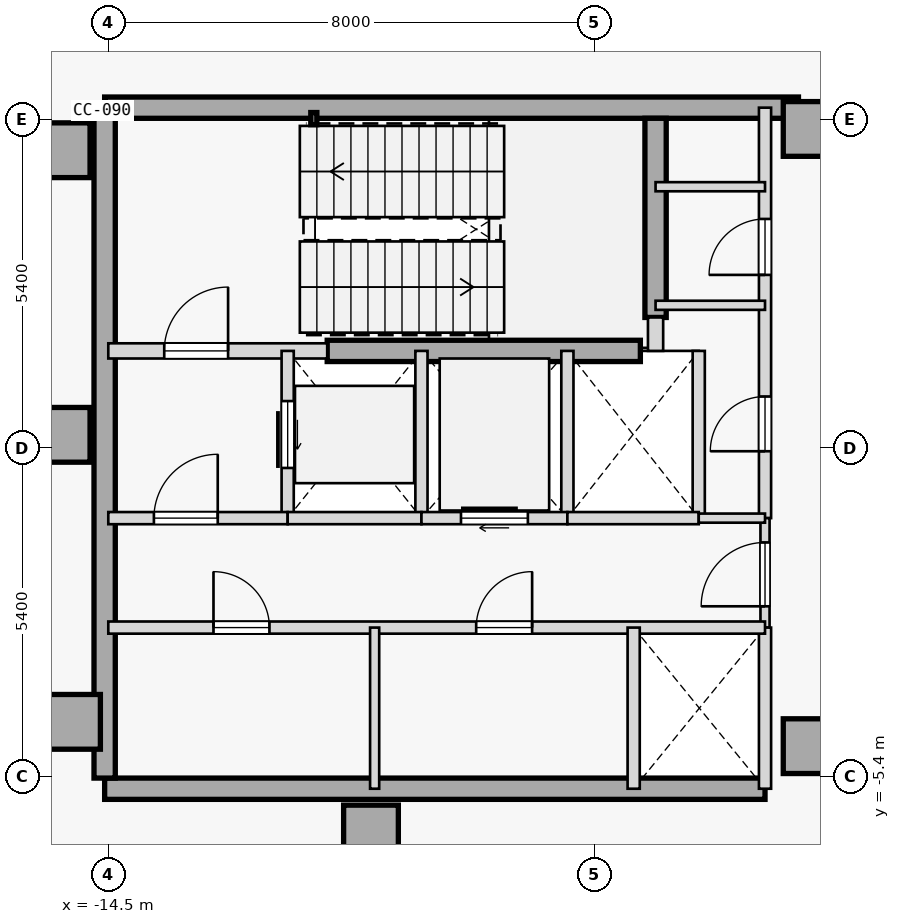
"""IFC4 building model, lengths in metres.
Left out: names, types, materials, properties, quantities, classifications, styles, units other than length and angle.
Written with IfcOpenShell. Run it as: python <this file> out.ifc"""

import sys

from ifc_helpers import new_model, si_unit, direction, frame, frame_2d, origin, origin_2d, place, context, subcontext, project, spatial, rectangle, hollow_rectangle, extrude, element, fill, save


model = new_model("IFC4")
c1 = context("Model", 3, precision=1e-05, world=origin(), true_north=direction((0.0, 1.0)))
c2 = subcontext(c1, "Body", "Model", "MODEL_VIEW")
j1 = project(units=[si_unit("LENGTHUNIT", "METRE"), si_unit("PLANEANGLEUNIT", "RADIAN")], contexts=[c1])
p1 = place(None, origin())
s1 = spatial("IfcSite", under=j1, at=p1, CompositionType="ELEMENT")
p2 = place(p1, origin())
s2 = spatial("IfcBuilding", under=s1, at=p2, CompositionType="ELEMENT")
p3 = place(p2, frame((0.0, 0.0, 254.45)))
s3 = spatial("IfcBuildingStorey", under=s2, at=p3, CompositionType="ELEMENT", Elevation=254.45)
for number, where, z_axis, x_axis in (
    (1, (-15.25, 4.9, 0.0), (0.0, 0.0, 1.0), (1.0, 0.0, 0.0)),
    (2, (-15.25, 0.22, 0.0), (0.0, 0.0, 1.0), (1.0, 0.0, 0.0)),
    (3, (-15.08, -4.5, 0.0), (0.0, 0.0, 1.0), (1.0, 0.0, 0.0)),
    (4, (-10.18, -6.32, 0.0), (0.0, 0.0, 1.0), (1.0, 0.0, 0.0)),
    (5, (-2.95, -4.9, 0.0), (0.0, 0.0, 1.0), (1.0, 0.0, 0.0)),
    (6, (-2.95, 5.25, 0.0), (0.0, 0.0, 1.0), (1.0, 0.0, 0.0)),
):
    element("IfcColumn", number, at=place(p3, frame(where, z_axis=z_axis, x_axis=x_axis)), inside=s3, PredefinedType="COLUMN", context=c2, shape_type="SweptSolid", body=[
        extrude(rectangle(XDim=0.9, YDim=0.9, at=origin_2d()), origin(), (0.0, 0.0, 1.0), 4.4),
    ])
p4 = place(p3, frame((-14.56, 5.6, 0.0), z_axis=(0.0, 0.0, 1.0), x_axis=(1.0, 0.0, 0.0)))
e7 = element("IfcWall", 7, at=p4, inside=s3, PredefinedType="SHEAR", context=c2, shape_type="SweptSolid", body=[
    extrude(rectangle(XDim=11.41, YDim=0.35, at=frame_2d((5.705, 0.0))), origin(), (0.0, 0.0, 1.0), 4.175),
])
p5 = place(p3, frame((-14.56, -5.6, 0.0), z_axis=(0.0, 0.0, 1.0), x_axis=(1.0, 0.0, 0.0)))
e8 = element("IfcWall", 8, at=p5, inside=s3, PredefinedType="SHEAR", context=c2, shape_type="SweptSolid", body=[
    extrude(rectangle(XDim=10.86, YDim=0.35, at=frame_2d((5.43, 0.0))), origin(), (0.0, 0.0, 1.0), 4.175),
])
p6 = place(p3, frame((-14.56, -5.425, 0.0), z_axis=(0.0, 0.0, 1.0), x_axis=(0.0, 1.0, 0.0)))
e9 = element("IfcWall", 9, at=p6, inside=s3, PredefinedType="SHEAR", context=c2, shape_type="SweptSolid", body=[
    extrude(rectangle(XDim=10.85, YDim=0.35, at=frame_2d((5.425, 0.0))), origin(), (0.0, 0.0, 1.0), 4.175),
])
p7 = place(p3, frame((-5.5, 2.15, 0.0), z_axis=(0.0, 0.0, 1.0), x_axis=(0.0, 1.0, 0.0)))
e10 = element("IfcWall", 10, at=p7, inside=s3, PredefinedType="SHEAR", context=c2, shape_type="SweptSolid", body=[
    extrude(rectangle(XDim=3.275, YDim=0.35, at=frame_2d((1.638, 0.0))), origin(), (0.0, 0.0, 1.0), 4.175),
])
p8 = place(p3, frame((-10.9, 1.6, 0.0), z_axis=(0.0, 0.0, 1.0), x_axis=(1.0, 0.0, 0.0)))
e11 = element("IfcWall", 11, at=p8, inside=s3, PredefinedType="SHEAR", context=c2, shape_type="SweptSolid", body=[
    extrude(rectangle(XDim=5.15, YDim=0.35, at=frame_2d((2.575, 0.0))), origin(), (0.0, 0.0, 1.0), 4.175),
])
p9 = place(p3, frame((-11.12, 5.42, 0.0), z_axis=(0.0, 0.0, 1.0), x_axis=(1.0, 0.0, 0.0)))
e12 = element("IfcColumn", 12, at=p9, inside=s3, PredefinedType="COLUMN", context=c2, shape_type="SweptSolid", body=[
    extrude(hollow_rectangle(XDim=0.1, YDim=0.2, WallThickness=0.008, at=origin_2d()), origin(), (0.0, 0.0, 1.0), 4.4),
])
p10 = place(p3, frame((18.109, 25.392, 0.0), z_axis=(0.0, 0.0, 1.0), x_axis=(-0.913544894419, -0.406737908095, 0.0)))
e13 = element("IfcWall", 13, at=p10, inside=s3, PredefinedType="STANDARD", context=c2, shape_type="SweptSolid", body=[
    extrude(rectangle(XDim=51.31, YDim=0.3, at=frame_2d((25.655, 0.0))), origin(), (0.0, 0.0, 1.0), 4.175),
])
p11 = place(p10, frame((27.87, 0.0, 0.0)))
e14 = element("IfcOpeningElement", 14, at=p11, cuts=e13, PredefinedType="OPENING", context=c2, shape_type="SweptSolid", body=[
    extrude(rectangle(XDim=1.1, YDim=2.2, at=frame_2d((0.55, 1.1))), frame((0.0, 0.16, 0.0), z_axis=(0.0, -1.0, 0.0), x_axis=(1.0, 0.0, 0.0)), (0.0, 0.0, 1.0), 0.32),
])
p12 = place(p3, frame((-14.5, 1.6, 0.0), z_axis=(0.0, 0.0, 1.0), x_axis=(1.0, 0.0, 0.0)))
e15 = element("IfcWall", 15, at=p12, inside=s3, PredefinedType="STANDARD", context=c2, shape_type="SweptSolid", body=[
    extrude(rectangle(XDim=3.6, YDim=0.25, at=frame_2d((1.8, 0.0))), origin(), (0.0, 0.0, 1.0), 4.175),
])
p13 = place(p12, frame((0.92, 0.0, 0.0)))
e16 = element("IfcOpeningElement", 16, at=p13, cuts=e15, PredefinedType="OPENING", context=c2, shape_type="SweptSolid", body=[
    extrude(rectangle(XDim=1.05, YDim=2.15, at=frame_2d((0.525, 1.075))), frame((0.0, 0.135, 0.0), z_axis=(0.0, -1.0, 0.0), x_axis=(1.0, 0.0, 0.0)), (0.0, 0.0, 1.0), 0.27),
])
p14 = place(p3, frame((-5.5, 1.6, 0.0), z_axis=(0.0, 0.0, 1.0), x_axis=(0.0, 1.0, 0.0)))
e17 = element("IfcWall", 17, at=p14, inside=s3, PredefinedType="STANDARD", context=c2, shape_type="SweptSolid", body=[
    extrude(rectangle(XDim=0.55, YDim=0.25, at=frame_2d((0.275, 0.0))), origin(), (0.0, 0.0, 1.0), 4.175),
])
p15 = place(p3, frame((-3.7, -1.15, 0.0), z_axis=(0.0, 0.0, 1.0), x_axis=(0.0, 1.0, 0.0)))
e18 = element("IfcWall", 18, at=p15, inside=s3, PredefinedType="STANDARD", context=c2, shape_type="SweptSolid", body=[
    extrude(rectangle(XDim=6.75, YDim=0.2, at=frame_2d((3.375, 0.0))), origin(), (0.0, 0.0, 1.0), 4.175),
])
p16 = place(p15, frame((1.1, 0.0, 0.0)))
e19 = element("IfcOpeningElement", 19, at=p16, cuts=e18, PredefinedType="OPENING", context=c2, shape_type="SweptSolid", body=[
    extrude(rectangle(XDim=0.9, YDim=2.15, at=frame_2d((0.45, 1.075))), frame((0.0, 0.11, 0.0), z_axis=(0.0, -1.0, 0.0), x_axis=(1.0, 0.0, 0.0)), (0.0, 0.0, 1.0), 0.22),
])
p17 = place(p15, frame((4.0, 0.0, 0.0)))
e20 = element("IfcOpeningElement", 20, at=p17, cuts=e18, PredefinedType="OPENING", context=c2, shape_type="SweptSolid", body=[
    extrude(rectangle(XDim=0.92, YDim=2.15, at=frame_2d((0.46, 1.075))), frame((0.0, 0.11, 0.0), z_axis=(0.0, -1.0, 0.0), x_axis=(1.0, 0.0, 0.0)), (0.0, 0.0, 1.0), 0.22),
])
p18 = place(p3, frame((-3.7, -2.95, 0.0), z_axis=(0.0, 0.0, 1.0), x_axis=(0.0, 1.0, 0.0)))
e21 = element("IfcWall", 21, at=p18, inside=s3, PredefinedType="PARTITIONING", context=c2, shape_type="SweptSolid", body=[
    extrude(rectangle(XDim=1.8, YDim=0.15, at=frame_2d((0.9, 0.0))), origin(), (0.0, 0.0, 1.0), 4.175),
])
p19 = place(p18, frame((0.35, 0.0, 0.0)))
e22 = element("IfcOpeningElement", 22, at=p19, cuts=e21, PredefinedType="OPENING", context=c2, shape_type="SweptSolid", body=[
    extrude(rectangle(XDim=1.05, YDim=2.18, at=frame_2d((0.525, 1.09))), frame((0.0, 0.085, 0.0), z_axis=(0.0, -1.0, 0.0), x_axis=(1.0, 0.0, 0.0)), (0.0, 0.0, 1.0), 0.17),
])
p20 = place(p3, frame((-3.7, -5.6, 0.0), z_axis=(0.0, 0.0, 1.0), x_axis=(0.0, 1.0, 0.0)))
e23 = element("IfcWall", 23, at=p20, inside=s3, PredefinedType="STANDARD", context=c2, shape_type="SweptSolid", body=[
    extrude(rectangle(XDim=2.65, YDim=0.2, at=frame_2d((1.325, 0.0))), origin(), (0.0, 0.0, 1.0), 4.175),
])
p21 = place(p3, frame((-11.55, -1.15, 0.0), z_axis=(0.0, 0.0, 1.0), x_axis=(0.0, 1.0, 0.0)))
e24 = element("IfcWall", 24, at=p21, inside=s3, PredefinedType="STANDARD", context=c2, shape_type="SweptSolid", body=[
    extrude(rectangle(XDim=2.75, YDim=0.2, at=frame_2d((1.375, 0.0))), origin(), (0.0, 0.0, 1.0), 4.175),
])
p22 = place(p21, frame((0.825, 0.0, 0.0)))
e25 = element("IfcOpeningElement", 25, at=p22, cuts=e24, PredefinedType="OPENING", context=c2, shape_type="SweptSolid", body=[
    extrude(rectangle(XDim=1.1, YDim=2.15, at=frame_2d((0.55, 1.075))), frame((0.0, 0.11, 0.0), z_axis=(0.0, -1.0, 0.0), x_axis=(1.0, 0.0, 0.0)), (0.0, 0.0, 1.0), 0.22),
])
p23 = place(p3, frame((-9.35, -1.15, 0.0), z_axis=(0.0, 0.0, 1.0), x_axis=(0.0, 1.0, 0.0)))
e26 = element("IfcWall", 26, at=p23, inside=s3, PredefinedType="STANDARD", context=c2, shape_type="SweptSolid", body=[
    extrude(rectangle(XDim=2.75, YDim=0.2, at=frame_2d((1.375, 0.0))), origin(), (0.0, 0.0, 1.0), 4.175),
])
p24 = place(p3, frame((-14.5, -1.15, 0.0), z_axis=(0.0, 0.0, 1.0), x_axis=(1.0, 0.0, 0.0)))
e27 = element("IfcWall", 27, at=p24, inside=s3, PredefinedType="STANDARD", context=c2, shape_type="SweptSolid", body=[
    extrude(rectangle(XDim=2.95, YDim=0.2, at=frame_2d((1.475, 0.0))), origin(), (0.0, 0.0, 1.0), 4.175),
])
p25 = place(p24, frame((0.75, 0.0, 0.0)))
e28 = element("IfcOpeningElement", 28, at=p25, cuts=e27, PredefinedType="OPENING", context=c2, shape_type="SweptSolid", body=[
    extrude(rectangle(XDim=1.05, YDim=2.18, at=frame_2d((0.525, 1.09))), frame((0.0, 0.11, 0.0), z_axis=(0.0, -1.0, 0.0), x_axis=(1.0, 0.0, 0.0)), (0.0, 0.0, 1.0), 0.22),
])
p26 = place(p3, frame((-11.55, -1.15, 0.0), z_axis=(0.0, 0.0, 1.0), x_axis=(1.0, 0.0, 0.0)))
e29 = element("IfcWall", 29, at=p26, inside=s3, PredefinedType="STANDARD", context=c2, shape_type="SweptSolid", body=[
    extrude(rectangle(XDim=2.2, YDim=0.2, at=frame_2d((1.1, 0.0))), origin(), (0.0, 0.0, 1.0), 4.175),
])
p27 = place(p3, frame((-6.95, -1.15, 0.0), z_axis=(0.0, 0.0, 1.0), x_axis=(0.0, 1.0, 0.0)))
e30 = element("IfcWall", 30, at=p27, inside=s3, PredefinedType="STANDARD", context=c2, shape_type="SweptSolid", body=[
    extrude(rectangle(XDim=2.75, YDim=0.2, at=frame_2d((1.375, 0.0))), origin(), (0.0, 0.0, 1.0), 4.175),
])
p28 = place(p3, frame((-9.35, -1.15, 0.0), z_axis=(0.0, 0.0, 1.0), x_axis=(1.0, 0.0, 0.0)))
e31 = element("IfcWall", 31, at=p28, inside=s3, PredefinedType="STANDARD", context=c2, shape_type="SweptSolid", body=[
    extrude(rectangle(XDim=2.4, YDim=0.2, at=frame_2d((1.2, 0.0))), origin(), (0.0, 0.0, 1.0), 4.175),
])
p29 = place(p28, frame((0.65, 0.0, 0.0)))
e32 = element("IfcOpeningElement", 32, at=p29, cuts=e31, PredefinedType="OPENING", context=c2, shape_type="SweptSolid", body=[
    extrude(rectangle(XDim=1.1, YDim=2.15, at=frame_2d((0.55, 1.075))), frame((0.0, 0.11, 0.0), z_axis=(0.0, -1.0, 0.0), x_axis=(1.0, 0.0, 0.0)), (0.0, 0.0, 1.0), 0.22),
])
p30 = place(p3, frame((-4.79, -1.15, 0.0), z_axis=(0.0, 0.0, 1.0), x_axis=(0.0, 1.0, 0.0)))
e33 = element("IfcWall", 33, at=p30, inside=s3, PredefinedType="STANDARD", context=c2, shape_type="SweptSolid", body=[
    extrude(rectangle(XDim=2.75, YDim=0.2, at=frame_2d((1.375, 0.0))), origin(), (0.0, 0.0, 1.0), 4.175),
])
p31 = place(p3, frame((-6.95, -1.15, 0.0), z_axis=(0.0, 0.0, 1.0), x_axis=(1.0, 0.0, 0.0)))
e34 = element("IfcWall", 34, at=p31, inside=s3, PredefinedType="STANDARD", context=c2, shape_type="SweptSolid", body=[
    extrude(rectangle(XDim=2.16, YDim=0.2, at=frame_2d((1.08, 0.0))), origin(), (0.0, 0.0, 1.0), 4.175),
])
p32 = place(p3, frame((-4.79, -1.15, 0.0), z_axis=(0.0, 0.0, 1.0), x_axis=(1.0, 0.0, 0.0)))
e35 = element("IfcWall", 35, at=p32, inside=s3, PredefinedType="PARTITIONING", context=c2, shape_type="SweptSolid", body=[
    extrude(rectangle(XDim=1.09, YDim=0.15, at=frame_2d((0.545, 0.0))), origin(), (0.0, 0.0, 1.0), 4.175),
])
p33 = place(p3, frame((-14.5, -2.95, 0.0), z_axis=(0.0, 0.0, 1.0), x_axis=(1.0, 0.0, 0.0)))
e36 = element("IfcWall", 36, at=p33, inside=s3, PredefinedType="STANDARD", context=c2, shape_type="SweptSolid", body=[
    extrude(rectangle(XDim=10.8, YDim=0.2, at=frame_2d((5.4, 0.0))), origin(), (0.0, 0.0, 1.0), 4.175),
])
p34 = place(p33, frame((1.73, 0.0, 0.0)))
e37 = element("IfcOpeningElement", 37, at=p34, cuts=e36, PredefinedType="OPENING", context=c2, shape_type="SweptSolid", body=[
    extrude(rectangle(XDim=0.92, YDim=2.15, at=frame_2d((0.46, 1.075))), frame((0.0, 0.11, 0.0), z_axis=(0.0, -1.0, 0.0), x_axis=(1.0, 0.0, 0.0)), (0.0, 0.0, 1.0), 0.22),
])
p35 = place(p33, frame((6.05, 0.0, 0.0)))
e38 = element("IfcOpeningElement", 38, at=p35, cuts=e36, PredefinedType="OPENING", context=c2, shape_type="SweptSolid", body=[
    extrude(rectangle(XDim=0.92, YDim=2.15, at=frame_2d((0.46, 1.075))), frame((0.0, 0.11, 0.0), z_axis=(0.0, -1.0, 0.0), x_axis=(1.0, 0.0, 0.0)), (0.0, 0.0, 1.0), 0.22),
])
p36 = place(p3, frame((-5.86, -5.6, 0.0), z_axis=(0.0, 0.0, 1.0), x_axis=(0.0, 1.0, 0.0)))
e39 = element("IfcWall", 39, at=p36, inside=s3, PredefinedType="STANDARD", context=c2, shape_type="SweptSolid", body=[
    extrude(rectangle(XDim=2.65, YDim=0.2, at=frame_2d((1.325, 0.0))), origin(), (0.0, 0.0, 1.0), 4.175),
])
p37 = place(p3, frame((-10.12, -5.6, 0.0), z_axis=(0.0, 0.0, 1.0), x_axis=(0.0, 1.0, 0.0)))
e40 = element("IfcWall", 40, at=p37, inside=s3, PredefinedType="PARTITIONING", context=c2, shape_type="SweptSolid", body=[
    extrude(rectangle(XDim=2.65, YDim=0.15, at=frame_2d((1.325, 0.0))), origin(), (0.0, 0.0, 1.0), 4.175),
])
for number, where, z_axis, x_axis in (
    (41, (-5.5, 4.3, 0.0), (0.0, 0.0, 1.0), (1.0, 0.0, 0.0)),
    (42, (-5.5, 2.35, 0.0), (0.0, 0.0, 1.0), (1.0, 0.0, 0.0)),
):
    element("IfcWall", number, at=place(p3, frame(where, z_axis=z_axis, x_axis=x_axis)), inside=s3, PredefinedType="PARTITIONING", context=c2, shape_type="SweptSolid", body=[
        extrude(rectangle(XDim=1.8, YDim=0.15, at=frame_2d((0.9, 0.0))), origin(), (0.0, 0.0, 1.0), 4.175),
    ])
p38 = place(p13, origin())
e43 = element("IfcDoor", 43, at=p38, inside=s3, OperationType="SINGLE_SWING_RIGHT", PredefinedType="DOOR", context=c2, shape_type="SweptSolid", body=[
    extrude(rectangle(XDim=1.05, YDim=2.15, at=frame_2d((0.525, 1.075))), frame((0.0, 0.025, 0.0), z_axis=(0.0, -1.0, 0.0), x_axis=(1.0, 0.0, 0.0)), (0.0, 0.0, 1.0), 0.05),
])
fill(e16, e43)
p39 = place(p25, origin())
e44 = element("IfcDoor", 44, at=p39, inside=s3, OperationType="SINGLE_SWING_RIGHT", PredefinedType="DOOR", context=c2, shape_type="SweptSolid", body=[
    extrude(rectangle(XDim=1.05, YDim=2.18, at=frame_2d((0.525, 1.09))), frame((0.0, 0.025, 0.0), z_axis=(0.0, -1.0, 0.0), x_axis=(1.0, 0.0, 0.0)), (0.0, 0.0, 1.0), 0.05),
])
fill(e28, e44)
p40 = place(p19, origin())
e45 = element("IfcDoor", 45, at=p40, inside=s3, OperationType="SINGLE_SWING_LEFT", PredefinedType="DOOR", context=c2, shape_type="SweptSolid", body=[
    extrude(rectangle(XDim=1.05, YDim=2.18, at=frame_2d((0.525, 1.09))), frame((0.0, 0.025, 0.0), z_axis=(0.0, -1.0, 0.0), x_axis=(1.0, 0.0, 0.0)), (0.0, 0.0, 1.0), 0.05),
])
fill(e22, e45)
p41 = place(p22, origin())
e46 = element("IfcDoor", 46, at=p41, inside=s3, OperationType="SLIDING_TO_RIGHT", PredefinedType="DOOR", context=c2, shape_type="SweptSolid", body=[
    extrude(rectangle(XDim=1.1, YDim=2.15, at=frame_2d((0.55, 1.075))), frame((0.0, 0.025, 0.0), z_axis=(0.0, -1.0, 0.0), x_axis=(1.0, 0.0, 0.0)), (0.0, 0.0, 1.0), 0.05),
])
fill(e25, e46)
p42 = place(p29, origin())
e47 = element("IfcDoor", 47, at=p42, inside=s3, OperationType="SLIDING_TO_RIGHT", PredefinedType="DOOR", context=c2, shape_type="SweptSolid", body=[
    extrude(rectangle(XDim=1.1, YDim=2.15, at=frame_2d((0.55, 1.075))), frame((0.0, 0.025, 0.0), z_axis=(0.0, -1.0, 0.0), x_axis=(1.0, 0.0, 0.0)), (0.0, 0.0, 1.0), 0.05),
])
fill(e32, e47)
p43 = place(p34, origin())
e48 = element("IfcDoor", 48, at=p43, inside=s3, OperationType="SINGLE_SWING_LEFT", PredefinedType="DOOR", context=c2, shape_type="SweptSolid", body=[
    extrude(rectangle(XDim=0.92, YDim=2.15, at=frame_2d((0.46, 1.075))), frame((0.0, 0.025, 0.0), z_axis=(0.0, -1.0, 0.0), x_axis=(1.0, 0.0, 0.0)), (0.0, 0.0, 1.0), 0.05),
])
fill(e37, e48)
p44 = place(p35, origin())
e49 = element("IfcDoor", 49, at=p44, inside=s3, OperationType="SINGLE_SWING_RIGHT", PredefinedType="DOOR", context=c2, shape_type="SweptSolid", body=[
    extrude(rectangle(XDim=0.92, YDim=2.15, at=frame_2d((0.46, 1.075))), frame((0.0, 0.025, 0.0), z_axis=(0.0, -1.0, 0.0), x_axis=(1.0, 0.0, 0.0)), (0.0, 0.0, 1.0), 0.05),
])
fill(e38, e49)
p45 = place(p16, origin())
e50 = element("IfcDoor", 50, at=p45, inside=s3, OperationType="SINGLE_SWING_LEFT", PredefinedType="DOOR", context=c2, shape_type="SweptSolid", body=[
    extrude(rectangle(XDim=0.9, YDim=2.15, at=frame_2d((0.45, 1.075))), frame((0.0, 0.025, 0.0), z_axis=(0.0, -1.0, 0.0), x_axis=(1.0, 0.0, 0.0)), (0.0, 0.0, 1.0), 0.05),
])
fill(e19, e50)
p46 = place(p17, origin())
e51 = element("IfcDoor", 51, at=p46, inside=s3, OperationType="SINGLE_SWING_LEFT", PredefinedType="DOOR", context=c2, shape_type="SweptSolid", body=[
    extrude(rectangle(XDim=0.92, YDim=2.15, at=frame_2d((0.46, 1.075))), frame((0.0, 0.025, 0.0), z_axis=(0.0, -1.0, 0.0), x_axis=(1.0, 0.0, 0.0)), (0.0, 0.0, 1.0), 0.05),
])
fill(e20, e51)
save(model, sys.argv[1])
